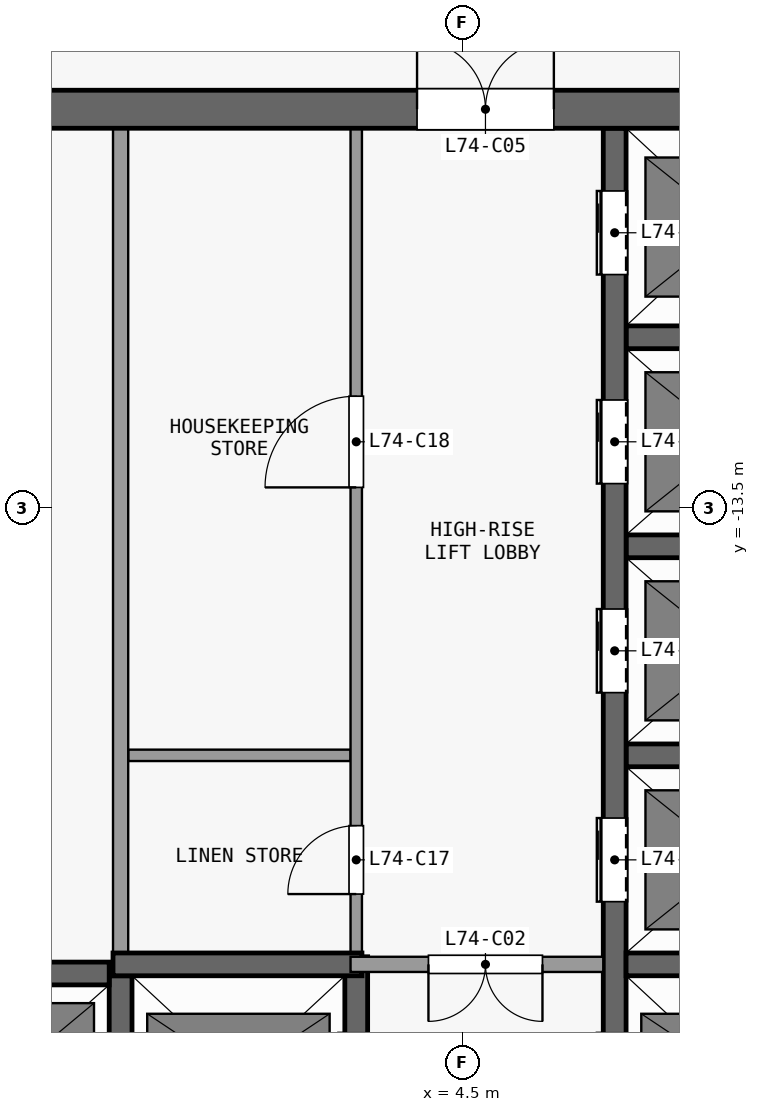
"""IFC4 building model, lengths in metres.
Left out: names, types, materials, properties, quantities, classifications, styles, units other than length and angle.
Written with IfcOpenShell. Run it as: python <this file> out.ifc"""

import sys

from ifc_helpers import new_model, si_unit, direction, frame, frame_2d, origin, place, context, subcontext, project, spatial, rectangle, extrude, element, fill, save


model = new_model("IFC4")
c1 = context("Model", 3, precision=1e-05, world=origin(), true_north=direction((0.0, 1.0)))
c2 = subcontext(c1, "Body", "Model", "MODEL_VIEW")
j1 = project(units=[si_unit("LENGTHUNIT", "METRE"), si_unit("PLANEANGLEUNIT", "RADIAN")], contexts=[c1])
p1 = place(None, origin())
s1 = spatial("IfcSite", under=j1, at=p1, CompositionType="ELEMENT")
p2 = place(p1, origin())
s2 = spatial("IfcBuilding", under=s1, at=p2, CompositionType="ELEMENT")
p3 = place(p2, frame((0.0, 0.0, 291.5)))
s3 = spatial("IfcBuildingStorey", under=s2, at=p3, CompositionType="ELEMENT", Elevation=291.5)
p4 = place(p3, frame((-13.1, -8.25, 0.0), z_axis=(0.0, 0.0, 1.0), x_axis=(1.0, 0.0, 0.0)))
e1 = element("IfcWall", 1, at=p4, inside=s3, PredefinedType="SHEAR", context=c2, shape_type="SweptSolid", body=[
    extrude(rectangle(XDim=26.2, YDim=0.5, at=frame_2d((13.1, 0.0))), origin(), (0.0, 0.0, 1.0), 3.3),
])
p5 = place(p4, frame((7.4, 0.0, 0.0)))
e2 = element("IfcOpeningElement", 2, at=p5, cuts=e1, PredefinedType="OPENING", context=c2, shape_type="SweptSolid", body=[
    extrude(rectangle(XDim=1.8, YDim=2.1, at=frame_2d((0.9, 1.05))), frame((0.0, 0.26, 0.0), z_axis=(0.0, -1.0, 0.0), x_axis=(1.0, 0.0, 0.0)), (0.0, 0.0, 1.0), 0.52),
])
p6 = place(p4, frame((17.0, 0.0, 0.0)))
e3 = element("IfcOpeningElement", 3, at=p6, cuts=e1, PredefinedType="OPENING", context=c2, shape_type="SweptSolid", body=[
    extrude(rectangle(XDim=1.8, YDim=2.1, at=frame_2d((0.9, 1.05))), frame((0.0, 0.26, 0.0), z_axis=(0.0, -1.0, 0.0), x_axis=(1.0, 0.0, 0.0)), (0.0, 0.0, 1.0), 0.52),
])
p7 = place(p4, frame((2.325, 0.0, 0.0)))
e4 = element("IfcOpeningElement", 4, at=p7, cuts=e1, PredefinedType="OPENING", context=c2, shape_type="SweptSolid", body=[
    extrude(rectangle(XDim=0.9, YDim=2.1, at=frame_2d((0.45, 1.05))), frame((0.0, 0.26, 0.0), z_axis=(0.0, -1.0, 0.0), x_axis=(1.0, 0.0, 0.0)), (0.0, 0.0, 1.0), 0.52),
])
p8 = place(p4, frame((22.975, 0.0, 0.0)))
e5 = element("IfcOpeningElement", 5, at=p8, cuts=e1, PredefinedType="OPENING", context=c2, shape_type="SweptSolid", body=[
    extrude(rectangle(XDim=0.9, YDim=2.1, at=frame_2d((0.45, 1.05))), frame((0.0, 0.26, 0.0), z_axis=(0.0, -1.0, 0.0), x_axis=(1.0, 0.0, 0.0)), (0.0, 0.0, 1.0), 0.52),
])
p9 = place(p3, frame((-3.2, -19.62, 0.0), z_axis=(0.0, 0.0, 1.0), x_axis=(1.0, 0.0, 0.0)))
e6 = element("IfcWall", 6, at=p9, inside=s3, PredefinedType="SHEAR", context=c2, shape_type="SweptSolid", body=[
    extrude(rectangle(XDim=3.05, YDim=0.3, at=frame_2d((1.525, 0.0))), origin(), (0.0, 0.0, 1.0), 3.3),
])
p10 = place(p3, frame((-0.1, -19.5, 0.0), z_axis=(0.0, 0.0, 1.0), x_axis=(1.0, 0.0, 0.0)))
e7 = element("IfcWall", 7, at=p10, inside=s3, PredefinedType="SHEAR", context=c2, shape_type="SweptSolid", body=[
    extrude(rectangle(XDim=3.275, YDim=0.3, at=frame_2d((1.638, 0.0))), origin(), (0.0, 0.0, 1.0), 3.3),
])
p11 = place(p3, frame((6.35, -19.5, 0.0), z_axis=(0.0, 0.0, 1.0), x_axis=(-1.0, 0.0, 0.0)))
e8 = element("IfcWall", 8, at=p11, inside=s3, PredefinedType="PARTITIONING", context=c2, shape_type="SweptSolid", body=[
    extrude(rectangle(XDim=3.325, YDim=0.2, at=frame_2d((1.663, 0.0))), origin(), (0.0, 0.0, 1.0), 3.3),
])
p12 = place(p11, frame((0.8, 0.0, 0.0)))
e9 = element("IfcOpeningElement", 9, at=p12, cuts=e8, PredefinedType="OPENING", context=c2, shape_type="SweptSolid", body=[
    extrude(rectangle(XDim=1.5, YDim=2.1, at=frame_2d((0.75, 1.05))), frame((0.0, 0.11, 0.0), z_axis=(0.0, -1.0, 0.0), x_axis=(1.0, 0.0, 0.0)), (0.0, 0.0, 1.0), 0.22),
])
p13 = place(p3, frame((6.65, -19.5, 0.0), z_axis=(0.0, 0.0, 1.0), x_axis=(1.0, 0.0, 0.0)))
e10 = element("IfcWall", 10, at=p13, inside=s3, PredefinedType="SHEAR", context=c2, shape_type="SweptSolid", body=[
    extrude(rectangle(XDim=2.8, YDim=0.3, at=frame_2d((1.4, 0.0))), origin(), (0.0, 0.0, 1.0), 3.3),
])
p14 = place(p3, frame((0.1, -16.75, 0.0), z_axis=(0.0, 0.0, 1.0), x_axis=(1.0, 0.0, 0.0)))
e11 = element("IfcWall", 11, at=p14, inside=s3, PredefinedType="PARTITIONING", context=c2, shape_type="SweptSolid", body=[
    extrude(rectangle(XDim=2.925, YDim=0.15, at=frame_2d((1.462, 0.0))), origin(), (0.0, 0.0, 1.0), 3.3),
])
for number, where, z_axis, x_axis in (
    (12, (6.65, -16.75, 0.0), (0.0, 0.0, 1.0), (1.0, 0.0, 0.0)),
    (13, (6.65, -14.0, 0.0), (0.0, 0.0, 1.0), (1.0, 0.0, 0.0)),
    (14, (6.65, -11.25, 0.0), (0.0, 0.0, 1.0), (1.0, 0.0, 0.0)),
):
    element("IfcWall", number, at=place(p3, frame(where, z_axis=z_axis, x_axis=x_axis)), inside=s3, PredefinedType="SHEAR", context=c2, shape_type="SweptSolid", body=[
        extrude(rectangle(XDim=2.8, YDim=0.3, at=frame_2d((1.4, 0.0))), origin(), (0.0, 0.0, 1.0), 3.3),
    ])
p15 = place(p3, frame((0.0, -22.25, 0.0), z_axis=(0.0, 0.0, 1.0), x_axis=(0.0, 1.0, 0.0)))
e15 = element("IfcWall", 15, at=p15, inside=s3, PredefinedType="SHEAR", context=c2, shape_type="SweptSolid", body=[
    extrude(rectangle(XDim=2.6, YDim=0.3, at=frame_2d((1.3, 0.0))), origin(), (0.0, 0.0, 1.0), 3.3),
])
p16 = place(p3, frame((0.0, -19.35, 0.0), z_axis=(0.0, 0.0, 1.0), x_axis=(0.0, 1.0, 0.0)))
e16 = element("IfcWall", 16, at=p16, inside=s3, PredefinedType="PARTITIONING", context=c2, shape_type="SweptSolid", body=[
    extrude(rectangle(XDim=10.85, YDim=0.2, at=frame_2d((5.425, 0.0))), origin(), (0.0, 0.0, 1.0), 3.3),
])
p17 = place(p3, frame((3.1, -22.25, 0.0), z_axis=(0.0, 0.0, 1.0), x_axis=(0.0, 1.0, 0.0)))
e17 = element("IfcWall", 17, at=p17, inside=s3, PredefinedType="SHEAR", context=c2, shape_type="SweptSolid", body=[
    extrude(rectangle(XDim=2.85, YDim=0.3, at=frame_2d((1.425, 0.0))), origin(), (0.0, 0.0, 1.0), 3.3),
])
p18 = place(p17, frame((0.75, 0.0, 0.0)))
e18 = element("IfcOpeningElement", 18, at=p18, cuts=e17, PredefinedType="OPENING", context=c2, shape_type="SweptSolid", body=[
    extrude(rectangle(XDim=1.1, YDim=2.1, at=frame_2d((0.55, 1.05))), frame((0.0, 0.16, 0.0), z_axis=(0.0, -1.0, 0.0), x_axis=(1.0, 0.0, 0.0)), (0.0, 0.0, 1.0), 0.32),
])
p19 = place(p3, frame((3.1, -19.4, 0.0), z_axis=(0.0, 0.0, 1.0), x_axis=(0.0, 1.0, 0.0)))
e19 = element("IfcWall", 19, at=p19, inside=s3, PredefinedType="PARTITIONING", context=c2, shape_type="SweptSolid", body=[
    extrude(rectangle(XDim=10.9, YDim=0.15, at=frame_2d((5.45, 0.0))), origin(), (0.0, 0.0, 1.0), 3.3),
])
p20 = place(p19, frame((0.825, 0.0, 0.0)))
e20 = element("IfcOpeningElement", 20, at=p20, cuts=e19, PredefinedType="OPENING", context=c2, shape_type="SweptSolid", body=[
    extrude(rectangle(XDim=0.9, YDim=2.1, at=frame_2d((0.45, 1.05))), frame((0.0, 0.085, 0.0), z_axis=(0.0, -1.0, 0.0), x_axis=(1.0, 0.0, 0.0)), (0.0, 0.0, 1.0), 0.17),
])
p21 = place(p19, frame((6.175, 0.0, 0.0)))
e21 = element("IfcOpeningElement", 21, at=p21, cuts=e19, PredefinedType="OPENING", context=c2, shape_type="SweptSolid", body=[
    extrude(rectangle(XDim=1.2, YDim=2.1, at=frame_2d((0.6, 1.05))), frame((0.0, 0.085, 0.0), z_axis=(0.0, -1.0, 0.0), x_axis=(1.0, 0.0, 0.0)), (0.0, 0.0, 1.0), 0.17),
])
p22 = place(p3, frame((6.5, -22.55, 0.0), z_axis=(0.0, 0.0, 1.0), x_axis=(0.0, 1.0, 0.0)))
e22 = element("IfcWall", 22, at=p22, inside=s3, PredefinedType="SHEAR", context=c2, shape_type="SweptSolid", body=[
    extrude(rectangle(XDim=14.05, YDim=0.3, at=frame_2d((7.025, 0.0))), origin(), (0.0, 0.0, 1.0), 3.3),
])
p23 = place(p22, frame((1.05, 0.0, 0.0)))
e23 = element("IfcOpeningElement", 23, at=p23, cuts=e22, PredefinedType="OPENING", context=c2, shape_type="SweptSolid", body=[
    extrude(rectangle(XDim=1.1, YDim=2.1, at=frame_2d((0.55, 1.05))), frame((0.0, 0.16, 0.0), z_axis=(0.0, -1.0, 0.0), x_axis=(1.0, 0.0, 0.0)), (0.0, 0.0, 1.0), 0.32),
])
p24 = place(p22, frame((3.875, 0.0, 0.0)))
e24 = element("IfcOpeningElement", 24, at=p24, cuts=e22, PredefinedType="OPENING", context=c2, shape_type="SweptSolid", body=[
    extrude(rectangle(XDim=1.1, YDim=2.1, at=frame_2d((0.55, 1.05))), frame((0.0, 0.16, 0.0), z_axis=(0.0, -1.0, 0.0), x_axis=(1.0, 0.0, 0.0)), (0.0, 0.0, 1.0), 0.32),
])
p25 = place(p22, frame((6.625, 0.0, 0.0)))
e25 = element("IfcOpeningElement", 25, at=p25, cuts=e22, PredefinedType="OPENING", context=c2, shape_type="SweptSolid", body=[
    extrude(rectangle(XDim=1.1, YDim=2.1, at=frame_2d((0.55, 1.05))), frame((0.0, 0.16, 0.0), z_axis=(0.0, -1.0, 0.0), x_axis=(1.0, 0.0, 0.0)), (0.0, 0.0, 1.0), 0.32),
])
p26 = place(p22, frame((9.375, 0.0, 0.0)))
e26 = element("IfcOpeningElement", 26, at=p26, cuts=e22, PredefinedType="OPENING", context=c2, shape_type="SweptSolid", body=[
    extrude(rectangle(XDim=1.1, YDim=2.1, at=frame_2d((0.55, 1.05))), frame((0.0, 0.16, 0.0), z_axis=(0.0, -1.0, 0.0), x_axis=(1.0, 0.0, 0.0)), (0.0, 0.0, 1.0), 0.32),
])
p27 = place(p22, frame((12.125, 0.0, 0.0)))
e27 = element("IfcOpeningElement", 27, at=p27, cuts=e22, PredefinedType="OPENING", context=c2, shape_type="SweptSolid", body=[
    extrude(rectangle(XDim=1.1, YDim=2.1, at=frame_2d((0.55, 1.05))), frame((0.0, 0.16, 0.0), z_axis=(0.0, -1.0, 0.0), x_axis=(1.0, 0.0, 0.0)), (0.0, 0.0, 1.0), 0.32),
])
p28 = place(p24, origin())
e28 = element("IfcDoor", 28, at=p28, inside=s3, OperationType="DOUBLE_DOOR_SLIDING", PredefinedType="DOOR", context=c2, shape_type="SweptSolid", body=[
    extrude(rectangle(XDim=1.1, YDim=2.1, at=frame_2d((0.55, 1.05))), frame((0.0, 0.025, 0.0), z_axis=(0.0, -1.0, 0.0), x_axis=(1.0, 0.0, 0.0)), (0.0, 0.0, 1.0), 0.05),
])
fill(e24, e28)
p29 = place(p25, origin())
e29 = element("IfcDoor", 29, at=p29, inside=s3, OperationType="DOUBLE_DOOR_SLIDING", PredefinedType="DOOR", context=c2, shape_type="SweptSolid", body=[
    extrude(rectangle(XDim=1.1, YDim=2.1, at=frame_2d((0.55, 1.05))), frame((0.0, 0.025, 0.0), z_axis=(0.0, -1.0, 0.0), x_axis=(1.0, 0.0, 0.0)), (0.0, 0.0, 1.0), 0.05),
])
fill(e25, e29)
p30 = place(p26, origin())
e30 = element("IfcDoor", 30, at=p30, inside=s3, OperationType="DOUBLE_DOOR_SLIDING", PredefinedType="DOOR", context=c2, shape_type="SweptSolid", body=[
    extrude(rectangle(XDim=1.1, YDim=2.1, at=frame_2d((0.55, 1.05))), frame((0.0, 0.025, 0.0), z_axis=(0.0, -1.0, 0.0), x_axis=(1.0, 0.0, 0.0)), (0.0, 0.0, 1.0), 0.05),
])
fill(e26, e30)
p31 = place(p27, origin())
e31 = element("IfcDoor", 31, at=p31, inside=s3, OperationType="DOUBLE_DOOR_SLIDING", PredefinedType="DOOR", context=c2, shape_type="SweptSolid", body=[
    extrude(rectangle(XDim=1.1, YDim=2.1, at=frame_2d((0.55, 1.05))), frame((0.0, 0.025, 0.0), z_axis=(0.0, -1.0, 0.0), x_axis=(1.0, 0.0, 0.0)), (0.0, 0.0, 1.0), 0.05),
])
fill(e27, e31)
p32 = place(p12, origin())
e32 = element("IfcDoor", 32, at=p32, inside=s3, OperationType="DOUBLE_DOOR_SINGLE_SWING", PredefinedType="DOOR", context=c2, shape_type="SweptSolid", body=[
    extrude(rectangle(XDim=1.5, YDim=2.1, at=frame_2d((0.75, 1.05))), frame((0.0, 0.025, 0.0), z_axis=(0.0, -1.0, 0.0), x_axis=(1.0, 0.0, 0.0)), (0.0, 0.0, 1.0), 0.05),
])
fill(e9, e32)
p33 = place(p6, origin())
e33 = element("IfcDoor", 33, at=p33, inside=s3, OperationType="DOUBLE_DOOR_SINGLE_SWING", PredefinedType="DOOR", context=c2, shape_type="SweptSolid", body=[
    extrude(rectangle(XDim=1.8, YDim=2.1, at=frame_2d((0.9, 1.05))), frame((0.0, 0.025, 0.0), z_axis=(0.0, -1.0, 0.0), x_axis=(1.0, 0.0, 0.0)), (0.0, 0.0, 1.0), 0.05),
])
fill(e3, e33)
p34 = place(p20, origin())
e34 = element("IfcDoor", 34, at=p34, inside=s3, OperationType="SINGLE_SWING_LEFT", PredefinedType="DOOR", context=c2, shape_type="SweptSolid", body=[
    extrude(rectangle(XDim=0.9, YDim=2.1, at=frame_2d((0.45, 1.05))), frame((0.0, 0.025, 0.0), z_axis=(0.0, -1.0, 0.0), x_axis=(1.0, 0.0, 0.0)), (0.0, 0.0, 1.0), 0.05),
])
fill(e20, e34)
p35 = place(p21, origin())
e35 = element("IfcDoor", 35, at=p35, inside=s3, OperationType="SINGLE_SWING_LEFT", PredefinedType="DOOR", context=c2, shape_type="SweptSolid", body=[
    extrude(rectangle(XDim=1.2, YDim=2.1, at=frame_2d((0.6, 1.05))), frame((0.0, 0.025, 0.0), z_axis=(0.0, -1.0, 0.0), x_axis=(1.0, 0.0, 0.0)), (0.0, 0.0, 1.0), 0.05),
])
fill(e21, e35)
save(model, sys.argv[1])
